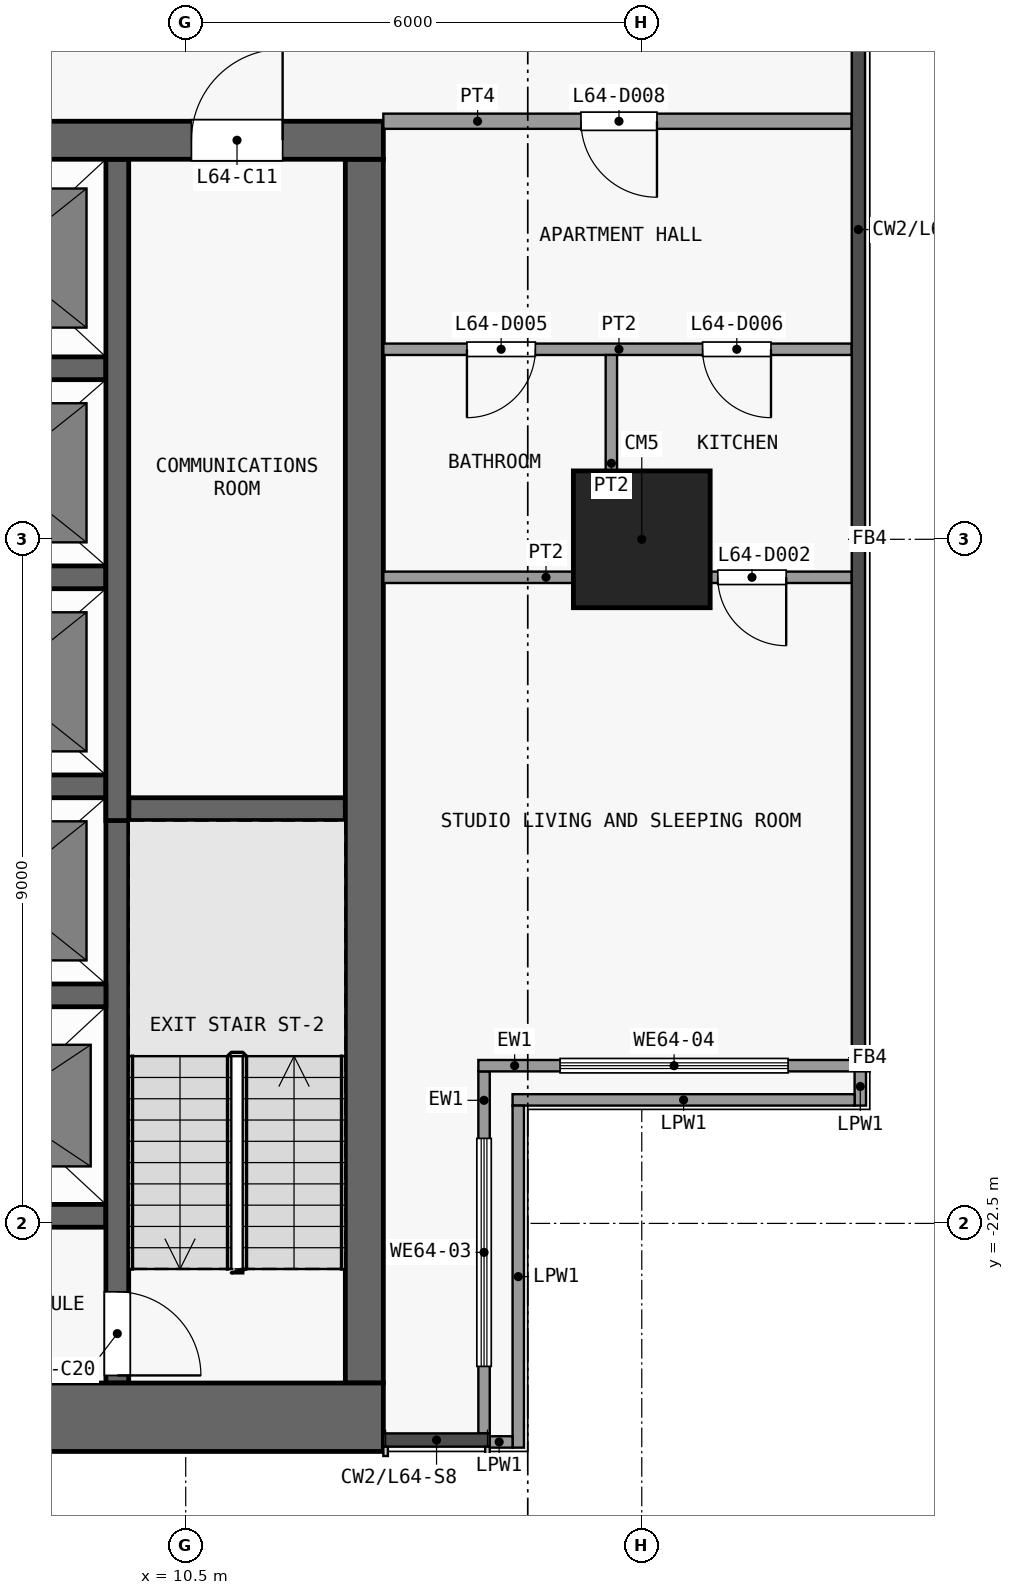
"""IFC4 building model, lengths in metres.
Left out: names, types, materials, properties, quantities, classifications, styles, units other than length and angle.
Written with IfcOpenShell. Run it as: python <this file> out.ifc"""

import sys

from ifc_helpers import new_model, si_unit, direction, frame, frame_2d, origin, origin_2d, place, context, subcontext, project, spatial, rectangle, extrude, element, fill, save


model = new_model("IFC4")
c1 = context("Model", 3, precision=1e-05, world=origin(), true_north=direction((0.0, 1.0)))
c2 = subcontext(c1, "Body", "Model", "MODEL_VIEW")
j1 = project(units=[si_unit("LENGTHUNIT", "METRE"), si_unit("PLANEANGLEUNIT", "RADIAN")], contexts=[c1])
p1 = place(None, origin())
s1 = spatial("IfcSite", under=j1, at=p1, CompositionType="ELEMENT")
p2 = place(p1, origin())
s2 = spatial("IfcBuilding", under=s1, at=p2, CompositionType="ELEMENT")
p3 = place(p2, frame((0.0, 0.0, 255.5)))
s3 = spatial("IfcBuildingStorey", under=s2, at=p3, CompositionType="ELEMENT", Elevation=255.5)
p4 = place(p3, frame((16.5, -13.5, 0.0), z_axis=(0.0, 0.0, 1.0), x_axis=(1.0, 0.0, 0.0)))
e1 = element("IfcColumn", 1, at=p4, inside=s3, PredefinedType="COLUMN", context=c2, shape_type="SweptSolid", body=[
    extrude(rectangle(XDim=1.8, YDim=1.8, at=origin_2d()), origin(), (0.0, 0.0, 1.0), 3.6),
])
p5 = place(p3, frame((-13.1, -25.05, 0.0), z_axis=(0.0, 0.0, 1.0), x_axis=(1.0, 0.0, 0.0)))
e2 = element("IfcWall", 2, at=p5, inside=s3, PredefinedType="SHEAR", context=c2, shape_type="SweptSolid", body=[
    extrude(rectangle(XDim=26.2, YDim=0.9, at=frame_2d((13.1, 0.0))), origin(), (0.0, 0.0, 1.0), 3.3),
])
p6 = place(p3, frame((-13.1, -8.25, 0.0), z_axis=(0.0, 0.0, 1.0), x_axis=(1.0, 0.0, 0.0)))
e3 = element("IfcWall", 3, at=p6, inside=s3, PredefinedType="SHEAR", context=c2, shape_type="SweptSolid", body=[
    extrude(rectangle(XDim=26.2, YDim=0.5, at=frame_2d((13.1, 0.0))), origin(), (0.0, 0.0, 1.0), 3.3),
])
p7 = place(p6, frame((7.4, 0.0, 0.0)))
e4 = element("IfcOpeningElement", 4, at=p7, cuts=e3, PredefinedType="OPENING", context=c2, shape_type="SweptSolid", body=[
    extrude(rectangle(XDim=1.8, YDim=2.1, at=frame_2d((0.9, 1.05))), frame((0.0, 0.26, 0.0), z_axis=(0.0, -1.0, 0.0), x_axis=(1.0, 0.0, 0.0)), (0.0, 0.0, 1.0), 0.52),
])
p8 = place(p6, frame((17.0, 0.0, 0.0)))
e5 = element("IfcOpeningElement", 5, at=p8, cuts=e3, PredefinedType="OPENING", context=c2, shape_type="SweptSolid", body=[
    extrude(rectangle(XDim=1.8, YDim=2.1, at=frame_2d((0.9, 1.05))), frame((0.0, 0.26, 0.0), z_axis=(0.0, -1.0, 0.0), x_axis=(1.0, 0.0, 0.0)), (0.0, 0.0, 1.0), 0.52),
])
p9 = place(p6, frame((2.325, 0.0, 0.0)))
e6 = element("IfcOpeningElement", 6, at=p9, cuts=e3, PredefinedType="OPENING", context=c2, shape_type="SweptSolid", body=[
    extrude(rectangle(XDim=0.9, YDim=2.1, at=frame_2d((0.45, 1.05))), frame((0.0, 0.26, 0.0), z_axis=(0.0, -1.0, 0.0), x_axis=(1.0, 0.0, 0.0)), (0.0, 0.0, 1.0), 0.52),
])
p10 = place(p6, frame((23.675, 0.0, 0.0)))
e7 = element("IfcOpeningElement", 7, at=p10, cuts=e3, PredefinedType="OPENING", context=c2, shape_type="SweptSolid", body=[
    extrude(rectangle(XDim=1.2, YDim=2.1, at=frame_2d((0.6, 1.05))), frame((0.0, 0.26, 0.0), z_axis=(0.0, -1.0, 0.0), x_axis=(1.0, 0.0, 0.0)), (0.0, 0.0, 1.0), 0.52),
])
p11 = place(p3, frame((12.85, -24.6, 0.0), z_axis=(0.0, 0.0, 1.0), x_axis=(0.0, 1.0, 0.0)))
e8 = element("IfcWall", 8, at=p11, inside=s3, PredefinedType="SHEAR", context=c2, shape_type="SweptSolid", body=[
    extrude(rectangle(XDim=16.1, YDim=0.5, at=frame_2d((8.05, 0.0))), origin(), (0.0, 0.0, 1.0), 3.3),
])
for number, where, z_axis, x_axis in (
    (9, (6.65, -22.4, 0.0), (0.0, 0.0, 1.0), (1.0, 0.0, 0.0)),
    (10, (6.65, -19.5, 0.0), (0.0, 0.0, 1.0), (1.0, 0.0, 0.0)),
):
    element("IfcWall", number, at=place(p3, frame(where, z_axis=z_axis, x_axis=x_axis)), inside=s3, PredefinedType="SHEAR", context=c2, shape_type="SweptSolid", body=[
        extrude(rectangle(XDim=2.8, YDim=0.3, at=frame_2d((1.4, 0.0))), origin(), (0.0, 0.0, 1.0), 3.3),
    ])
p12 = place(p3, frame((9.75, -17.05, 0.0), z_axis=(0.0, 0.0, 1.0), x_axis=(1.0, 0.0, 0.0)))
e11 = element("IfcWall", 11, at=p12, inside=s3, PredefinedType="SHEAR", context=c2, shape_type="SweptSolid", body=[
    extrude(rectangle(XDim=2.85, YDim=0.3, at=frame_2d((1.425, 0.0))), origin(), (0.0, 0.0, 1.0), 3.3),
])
for number, where, z_axis, x_axis in (
    (12, (6.65, -16.75, 0.0), (0.0, 0.0, 1.0), (1.0, 0.0, 0.0)),
    (13, (6.65, -14.0, 0.0), (0.0, 0.0, 1.0), (1.0, 0.0, 0.0)),
    (14, (6.65, -11.25, 0.0), (0.0, 0.0, 1.0), (1.0, 0.0, 0.0)),
):
    element("IfcWall", number, at=place(p3, frame(where, z_axis=z_axis, x_axis=x_axis)), inside=s3, PredefinedType="SHEAR", context=c2, shape_type="SweptSolid", body=[
        extrude(rectangle(XDim=2.8, YDim=0.3, at=frame_2d((1.4, 0.0))), origin(), (0.0, 0.0, 1.0), 3.3),
    ])
p13 = place(p3, frame((9.6, -16.9, 0.0), z_axis=(0.0, 0.0, 1.0), x_axis=(0.0, -1.0, 0.0)))
e15 = element("IfcWall", 15, at=p13, inside=s3, PredefinedType="SHEAR", context=c2, shape_type="SweptSolid", body=[
    extrude(rectangle(XDim=7.7, YDim=0.3, at=frame_2d((3.85, 0.0))), origin(), (0.0, 0.0, 1.0), 3.3),
])
p14 = place(p13, frame((6.5, 0.0, 0.0)))
e16 = element("IfcOpeningElement", 16, at=p14, cuts=e15, PredefinedType="OPENING", context=c2, shape_type="SweptSolid", body=[
    extrude(rectangle(XDim=1.1, YDim=2.1, at=frame_2d((0.55, 1.05))), frame((0.0, 0.16, 0.0), z_axis=(0.0, -1.0, 0.0), x_axis=(1.0, 0.0, 0.0)), (0.0, 0.0, 1.0), 0.32),
])
p15 = place(p3, frame((9.6, -17.2, 0.0), z_axis=(0.0, 0.0, 1.0), x_axis=(0.0, 1.0, 0.0)))
e17 = element("IfcWall", 17, at=p15, inside=s3, PredefinedType="SHEAR", context=c2, shape_type="SweptSolid", body=[
    extrude(rectangle(XDim=8.7, YDim=0.3, at=frame_2d((4.35, 0.0))), origin(), (0.0, 0.0, 1.0), 3.3),
])
p16 = place(p3, frame((14.425, -20.5, 0.0), z_axis=(0.0, 0.0, 1.0), x_axis=(0.0, -1.0, 0.0)))
e18 = element("IfcWall", 18, at=p16, inside=s3, PredefinedType="SOLIDWALL", context=c2, shape_type="SweptSolid", body=[
    extrude(rectangle(XDim=4.762, YDim=0.15, at=frame_2d((2.381, 0.0))), origin(), (0.0, 0.0, 1.0), 3.3),
])
p17 = place(p16, frame((0.881, 0.0, 0.9)))
e19 = element("IfcOpeningElement", 19, at=p17, cuts=e18, PredefinedType="OPENING", context=c2, shape_type="SweptSolid", body=[
    extrude(rectangle(XDim=3.0, YDim=2.4, at=frame_2d((1.5, 1.2))), frame((0.0, 0.085, 0.0), z_axis=(0.0, -1.0, 0.0), x_axis=(1.0, 0.0, 0.0)), (0.0, 0.0, 1.0), 0.17),
])
p18 = place(p3, frame((19.5, -20.425, 0.0), z_axis=(0.0, 0.0, 1.0), x_axis=(-1.0, 0.0, 0.0)))
e20 = element("IfcWall", 20, at=p18, inside=s3, PredefinedType="SOLIDWALL", context=c2, shape_type="SweptSolid", body=[
    extrude(rectangle(XDim=5.15, YDim=0.15, at=frame_2d((2.575, 0.0))), origin(), (0.0, 0.0, 1.0), 3.3),
])
p19 = place(p18, frame((1.075, 0.0, 0.9)))
e21 = element("IfcOpeningElement", 21, at=p19, cuts=e20, PredefinedType="OPENING", context=c2, shape_type="SweptSolid", body=[
    extrude(rectangle(XDim=3.0, YDim=2.4, at=frame_2d((1.5, 1.2))), frame((0.0, 0.085, 0.0), z_axis=(0.0, -1.0, 0.0), x_axis=(1.0, 0.0, 0.0)), (0.0, 0.0, 1.0), 0.17),
])
p20 = place(p3, frame((19.375, -20.448, 0.0), z_axis=(0.0, 0.0, 1.0), x_axis=(0.0, -1.0, 0.0)))
e22 = element("IfcWall", 22, at=p20, inside=s3, PredefinedType="PARAPET", context=c2, shape_type="SweptSolid", body=[
    extrude(rectangle(XDim=0.502, YDim=0.15, at=frame_2d((0.251, 0.0))), origin(), (0.0, 0.0, 1.0), 1.15),
])
for number, where, z_axis, x_axis in (
    (23, (19.3, -20.875, 0.0), (0.0, 0.0, 1.0), (-1.0, 0.0, 0.0)),
    (24, (14.875, -20.95, 0.0), (0.0, 0.0, 1.0), (0.0, -1.0, 0.0)),
):
    element("IfcWall", number, at=place(p3, frame(where, z_axis=z_axis, x_axis=x_axis)), inside=s3, PredefinedType="PARAPET", context=c2, shape_type="SweptSolid", body=[
        extrude(rectangle(XDim=4.5, YDim=0.15, at=frame_2d((2.25, 0.0))), origin(), (0.0, 0.0, 1.0), 1.15),
    ])
p21 = place(p3, frame((14.8, -25.375, 0.0), z_axis=(0.0, 0.0, 1.0), x_axis=(-1.0, 0.0, 0.0)))
e25 = element("IfcWall", 25, at=p21, inside=s3, PredefinedType="PARAPET", context=c2, shape_type="SweptSolid", body=[
    extrude(rectangle(XDim=0.353, YDim=0.15, at=frame_2d((0.176, 0.0))), origin(), (0.0, 0.0, 1.0), 1.15),
])
p22 = place(p3, frame((13.1, -14.0, 0.0), z_axis=(0.0, 0.0, 1.0), x_axis=(1.0, 0.0, 0.0)))
e26 = element("IfcWall", 26, at=p22, inside=s3, PredefinedType="PARTITIONING", context=c2, shape_type="SweptSolid", body=[
    extrude(rectangle(XDim=6.162, YDim=0.15, at=frame_2d((3.081, 0.0))), origin(), (0.0, 0.0, 1.0), 3.3),
])
p23 = place(p22, frame((4.4, 0.0, 0.0)))
e27 = element("IfcOpeningElement", 27, at=p23, cuts=e26, PredefinedType="OPENING", context=c2, shape_type="SweptSolid", body=[
    extrude(rectangle(XDim=0.9, YDim=2.1, at=frame_2d((0.45, 1.05))), frame((0.0, 0.085, 0.0), z_axis=(0.0, -1.0, 0.0), x_axis=(1.0, 0.0, 0.0)), (0.0, 0.0, 1.0), 0.17),
])
p24 = place(p3, frame((13.1, -11.0, 0.0), z_axis=(0.0, 0.0, 1.0), x_axis=(1.0, 0.0, 0.0)))
e28 = element("IfcWall", 28, at=p24, inside=s3, PredefinedType="PARTITIONING", context=c2, shape_type="SweptSolid", body=[
    extrude(rectangle(XDim=6.162, YDim=0.15, at=frame_2d((3.081, 0.0))), origin(), (0.0, 0.0, 1.0), 3.3),
])
p25 = place(p24, frame((1.1, 0.0, 0.0)))
e29 = element("IfcOpeningElement", 29, at=p25, cuts=e28, PredefinedType="OPENING", context=c2, shape_type="SweptSolid", body=[
    extrude(rectangle(XDim=0.9, YDim=2.1, at=frame_2d((0.45, 1.05))), frame((0.0, 0.085, 0.0), z_axis=(0.0, -1.0, 0.0), x_axis=(1.0, 0.0, 0.0)), (0.0, 0.0, 1.0), 0.17),
])
p26 = place(p24, frame((4.2, 0.0, 0.0)))
e30 = element("IfcOpeningElement", 30, at=p26, cuts=e28, PredefinedType="OPENING", context=c2, shape_type="SweptSolid", body=[
    extrude(rectangle(XDim=0.9, YDim=2.1, at=frame_2d((0.45, 1.05))), frame((0.0, 0.085, 0.0), z_axis=(0.0, -1.0, 0.0), x_axis=(1.0, 0.0, 0.0)), (0.0, 0.0, 1.0), 0.17),
])
p27 = place(p3, frame((13.1, -8.0, 0.0), z_axis=(0.0, 0.0, 1.0), x_axis=(1.0, 0.0, 0.0)))
e31 = element("IfcWall", 31, at=p27, inside=s3, PredefinedType="PARTITIONING", context=c2, shape_type="SweptSolid", body=[
    extrude(rectangle(XDim=6.162, YDim=0.2, at=frame_2d((3.081, 0.0))), origin(), (0.0, 0.0, 1.0), 3.3),
])
p28 = place(p27, frame((2.6, 0.0, 0.0)))
e32 = element("IfcOpeningElement", 32, at=p28, cuts=e31, PredefinedType="OPENING", context=c2, shape_type="SweptSolid", body=[
    extrude(rectangle(XDim=1.0, YDim=2.1, at=frame_2d((0.5, 1.05))), frame((0.0, 0.11, 0.0), z_axis=(0.0, -1.0, 0.0), x_axis=(1.0, 0.0, 0.0)), (0.0, 0.0, 1.0), 0.22),
])
p29 = place(p3, frame((16.1, -13.925, 0.0), z_axis=(0.0, 0.0, 1.0), x_axis=(0.0, 1.0, 0.0)))
e33 = element("IfcWall", 33, at=p29, inside=s3, PredefinedType="PARTITIONING", context=c2, shape_type="SweptSolid", body=[
    extrude(rectangle(XDim=2.85, YDim=0.15, at=frame_2d((1.425, 0.0))), origin(), (0.0, 0.0, 1.0), 3.3),
])
p30 = place(p10, origin())
e34 = element("IfcDoor", 34, at=p30, inside=s3, OperationType="SINGLE_SWING_RIGHT", PredefinedType="DOOR", context=c2, shape_type="SweptSolid", body=[
    extrude(rectangle(XDim=1.2, YDim=2.1, at=frame_2d((0.6, 1.05))), frame((0.0, 0.025, 0.0), z_axis=(0.0, -1.0, 0.0), x_axis=(1.0, 0.0, 0.0)), (0.0, 0.0, 1.0), 0.05),
])
fill(e7, e34)
p31 = place(p14, origin())
e35 = element("IfcDoor", 35, at=p31, inside=s3, OperationType="SINGLE_SWING_RIGHT", PredefinedType="DOOR", context=c2, shape_type="SweptSolid", body=[
    extrude(rectangle(XDim=1.1, YDim=2.1, at=frame_2d((0.55, 1.05))), frame((0.0, 0.025, 0.0), z_axis=(0.0, -1.0, 0.0), x_axis=(1.0, 0.0, 0.0)), (0.0, 0.0, 1.0), 0.05),
])
fill(e16, e35)
p32 = place(p17, origin())
e36 = element("IfcWindow", 36, at=p32, inside=s3, PartitioningType="SINGLE_PANEL", PredefinedType="WINDOW", context=c2, shape_type="SweptSolid", body=[
    extrude(rectangle(XDim=3.0, YDim=2.4, at=frame_2d((1.5, 1.2))), frame((0.0, 0.03, 0.0), z_axis=(0.0, -1.0, 0.0), x_axis=(1.0, 0.0, 0.0)), (0.0, 0.0, 1.0), 0.06),
])
fill(e19, e36)
p33 = place(p19, origin())
e37 = element("IfcWindow", 37, at=p33, inside=s3, PartitioningType="SINGLE_PANEL", PredefinedType="WINDOW", context=c2, shape_type="SweptSolid", body=[
    extrude(rectangle(XDim=3.0, YDim=2.4, at=frame_2d((1.5, 1.2))), frame((0.0, 0.03, 0.0), z_axis=(0.0, -1.0, 0.0), x_axis=(1.0, 0.0, 0.0)), (0.0, 0.0, 1.0), 0.06),
])
fill(e21, e37)
p34 = place(p23, origin())
e38 = element("IfcDoor", 38, at=p34, inside=s3, OperationType="SINGLE_SWING_RIGHT", PredefinedType="DOOR", context=c2, shape_type="SweptSolid", body=[
    extrude(rectangle(XDim=0.9, YDim=2.1, at=frame_2d((0.45, 1.05))), frame((0.0, 0.025, 0.0), z_axis=(0.0, -1.0, 0.0), x_axis=(1.0, 0.0, 0.0)), (0.0, 0.0, 1.0), 0.05),
])
fill(e27, e38)
p35 = place(p25, origin())
e39 = element("IfcDoor", 39, at=p35, inside=s3, OperationType="SINGLE_SWING_LEFT", PredefinedType="DOOR", context=c2, shape_type="SweptSolid", body=[
    extrude(rectangle(XDim=0.9, YDim=2.1, at=frame_2d((0.45, 1.05))), frame((0.0, 0.025, 0.0), z_axis=(0.0, -1.0, 0.0), x_axis=(1.0, 0.0, 0.0)), (0.0, 0.0, 1.0), 0.05),
])
fill(e29, e39)
p36 = place(p26, origin())
e40 = element("IfcDoor", 40, at=p36, inside=s3, OperationType="SINGLE_SWING_RIGHT", PredefinedType="DOOR", context=c2, shape_type="SweptSolid", body=[
    extrude(rectangle(XDim=0.9, YDim=2.1, at=frame_2d((0.45, 1.05))), frame((0.0, 0.025, 0.0), z_axis=(0.0, -1.0, 0.0), x_axis=(1.0, 0.0, 0.0)), (0.0, 0.0, 1.0), 0.05),
])
fill(e30, e40)
p37 = place(p28, origin())
e41 = element("IfcDoor", 41, at=p37, inside=s3, OperationType="SINGLE_SWING_RIGHT", PredefinedType="DOOR", context=c2, shape_type="SweptSolid", body=[
    extrude(rectangle(XDim=1.0, YDim=2.1, at=frame_2d((0.5, 1.05))), frame((0.0, 0.025, 0.0), z_axis=(0.0, -1.0, 0.0), x_axis=(1.0, 0.0, 0.0)), (0.0, 0.0, 1.0), 0.05),
])
fill(e32, e41)
save(model, sys.argv[1])
